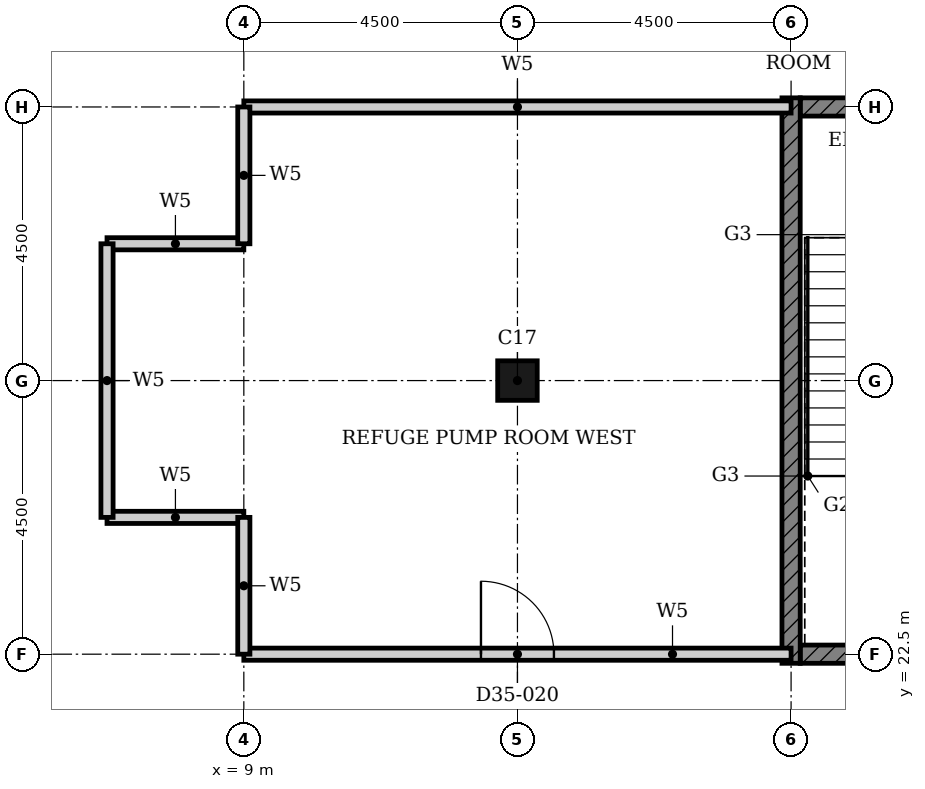
"""IFC4 building model, lengths in metres.
Left out: names, types, materials, properties, quantities, classifications, styles, units other than length and angle.
Written with IfcOpenShell. Run it as: python <this file> out.ifc"""

import sys

from ifc_helpers import new_model, si_unit, direction, frame, frame_2d, origin, origin_2d, place, context, subcontext, project, spatial, rectangle, hollow_rectangle, extrude, element, fill, save


model = new_model("IFC4")
c1 = context("Model", 3, precision=1e-05, world=origin(), true_north=direction((0.0, 1.0)))
c2 = subcontext(c1, "Body", "Model", "MODEL_VIEW")
j1 = project(units=[si_unit("LENGTHUNIT", "METRE"), si_unit("PLANEANGLEUNIT", "RADIAN")], contexts=[c1])
p1 = place(None, origin())
s1 = spatial("IfcSite", under=j1, at=p1, CompositionType="ELEMENT")
p2 = place(p1, origin())
s2 = spatial("IfcBuilding", under=s1, at=p2, CompositionType="ELEMENT")
p3 = place(p2, frame((0.0, 0.0, 140.4)))
s3 = spatial("IfcBuildingStorey", under=s2, at=p3, CompositionType="ELEMENT", Elevation=140.4)
p4 = place(p3, frame((13.5, 27.0, 0.0), z_axis=(0.0, 0.0, 1.0), x_axis=(1.0, 0.0, 0.0)))
e1 = element("IfcColumn", 1, at=p4, inside=s3, PredefinedType="COLUMN", context=c2, shape_type="SweptSolid", body=[
    extrude(hollow_rectangle(XDim=0.65, YDim=0.65, WallThickness=0.021, at=origin_2d()), origin(), (0.0, 0.0, 1.0), 4.8),
])
p5 = place(p3, frame((18.15, 22.5, 0.0), z_axis=(0.0, 0.0, 1.0), x_axis=(1.0, 0.0, 0.0)))
e2 = element("IfcWall", 2, at=p5, inside=s3, PredefinedType="SHEAR", context=c2, shape_type="SweptSolid", body=[
    extrude(rectangle(XDim=4.225, YDim=0.3, at=frame_2d((2.113, 0.0))), origin(), (0.0, 0.0, 1.0), 4.45),
])
p6 = place(p3, frame((18.15, 31.5, 0.0), z_axis=(0.0, 0.0, 1.0), x_axis=(1.0, 0.0, 0.0)))
e3 = element("IfcWall", 3, at=p6, inside=s3, PredefinedType="SHEAR", context=c2, shape_type="SweptSolid", body=[
    extrude(rectangle(XDim=6.797, YDim=0.3, at=frame_2d((3.398, 0.0))), origin(), (0.0, 0.0, 1.0), 4.45),
])
p7 = place(p6, frame((4.736, 0.0, 0.0)))
e4 = element("IfcOpeningElement", 4, at=p7, cuts=e3, PredefinedType="OPENING", context=c2, shape_type="SweptSolid", body=[
    extrude(rectangle(XDim=1.8, YDim=2.1, at=frame_2d((0.9, 1.05))), frame((0.0, 0.16, 0.0), z_axis=(0.0, -1.0, 0.0), x_axis=(1.0, 0.0, 0.0)), (0.0, 0.0, 1.0), 0.32),
])
p8 = place(p3, frame((18.0, 22.35, 0.0), z_axis=(0.0, 0.0, 1.0), x_axis=(0.0, 1.0, 0.0)))
e5 = element("IfcWall", 5, at=p8, inside=s3, PredefinedType="SHEAR", context=c2, shape_type="SweptSolid", body=[
    extrude(rectangle(XDim=9.3, YDim=0.3, at=frame_2d((4.65, 0.0))), origin(), (0.0, 0.0, 1.0), 4.45),
])
p9 = place(p3, frame((9.0, 22.5, 0.0), z_axis=(0.0, 0.0, 1.0), x_axis=(1.0, 0.0, 0.0)))
e6 = element("IfcWall", 6, at=p9, inside=s3, PredefinedType="PARTITIONING", context=c2, shape_type="SweptSolid", body=[
    extrude(rectangle(XDim=9.0, YDim=0.2, at=frame_2d((4.5, 0.0))), origin(), (0.0, 0.0, 1.0), 3.73),
])
p10 = place(p9, frame((3.9, 0.0, 0.0)))
e7 = element("IfcOpeningElement", 7, at=p10, cuts=e6, PredefinedType="OPENING", context=c2, shape_type="SweptSolid", body=[
    extrude(rectangle(XDim=1.2, YDim=2.1, at=frame_2d((0.6, 1.05))), frame((0.0, 0.11, 0.0), z_axis=(0.0, -1.0, 0.0), x_axis=(1.0, 0.0, 0.0)), (0.0, 0.0, 1.0), 0.22),
])
for number, where, z_axis, x_axis in (
    (8, (6.75, 24.75, 0.0), (0.0, 0.0, 1.0), (1.0, 0.0, 0.0)),
    (9, (6.75, 29.25, 0.0), (0.0, 0.0, 1.0), (1.0, 0.0, 0.0)),
):
    element("IfcWall", number, at=place(p3, frame(where, z_axis=z_axis, x_axis=x_axis)), inside=s3, PredefinedType="PARTITIONING", context=c2, shape_type="SweptSolid", body=[
        extrude(rectangle(XDim=2.25, YDim=0.2, at=frame_2d((1.125, 0.0))), origin(), (0.0, 0.0, 1.0), 4.45),
    ])
p11 = place(p3, frame((9.0, 31.5, 0.0), z_axis=(0.0, 0.0, 1.0), x_axis=(1.0, 0.0, 0.0)))
e10 = element("IfcWall", 10, at=p11, inside=s3, PredefinedType="PARTITIONING", context=c2, shape_type="SweptSolid", body=[
    extrude(rectangle(XDim=9.0, YDim=0.2, at=frame_2d((4.5, 0.0))), origin(), (0.0, 0.0, 1.0), 3.73),
])
p12 = place(p3, frame((6.75, 24.75, 0.0), z_axis=(0.0, 0.0, 1.0), x_axis=(0.0, 1.0, 0.0)))
e11 = element("IfcWall", 11, at=p12, inside=s3, PredefinedType="PARTITIONING", context=c2, shape_type="SweptSolid", body=[
    extrude(rectangle(XDim=4.5, YDim=0.2, at=frame_2d((2.25, 0.0))), origin(), (0.0, 0.0, 1.0), 4.45),
])
for number, where, z_axis, x_axis in (
    (12, (9.0, 22.5, 0.0), (0.0, 0.0, 1.0), (0.0, 1.0, 0.0)),
    (13, (9.0, 29.25, 0.0), (0.0, 0.0, 1.0), (0.0, 1.0, 0.0)),
):
    element("IfcWall", number, at=place(p3, frame(where, z_axis=z_axis, x_axis=x_axis)), inside=s3, PredefinedType="PARTITIONING", context=c2, shape_type="SweptSolid", body=[
        extrude(rectangle(XDim=2.25, YDim=0.2, at=frame_2d((1.125, 0.0))), origin(), (0.0, 0.0, 1.0), 4.45),
    ])
p13 = place(p10, origin())
e14 = element("IfcDoor", 14, at=p13, inside=s3, OperationType="SINGLE_SWING_RIGHT", PredefinedType="DOOR", context=c2, shape_type="SweptSolid", body=[
    extrude(rectangle(XDim=1.2, YDim=2.1, at=frame_2d((0.6, 1.05))), frame((0.0, 0.025, 0.0), z_axis=(0.0, -1.0, 0.0), x_axis=(1.0, 0.0, 0.0)), (0.0, 0.0, 1.0), 0.05),
])
fill(e7, e14)
save(model, sys.argv[1])
